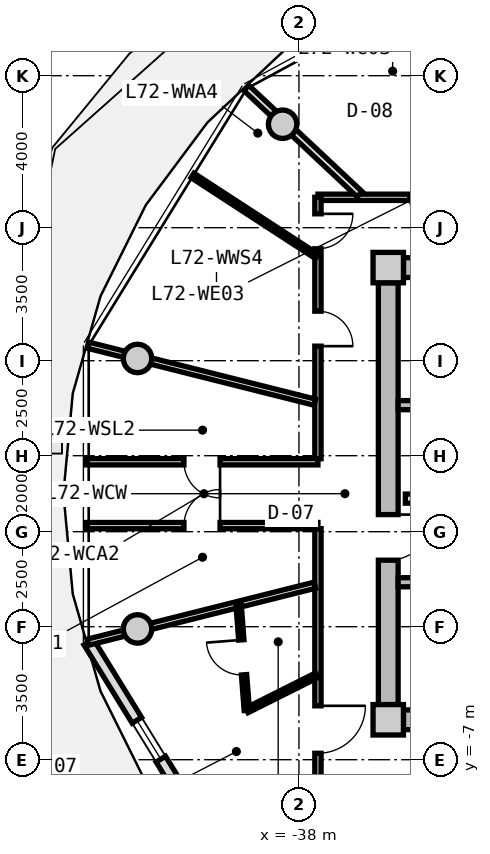
"""IFC4 building model, lengths in metres.
Left out: names, types, materials, properties, quantities, classifications, styles, units other than length and angle.
Written with IfcOpenShell. Run it as: python <this file> out.ifc"""

import sys

from ifc_helpers import new_model, si_unit, direction, frame, frame_2d, origin, origin_2d, place, context, subcontext, project, spatial, rectangle, circle, extrude, source, transform, mapped, element, fill, save


model = new_model("IFC4")
c1 = context("Model", 3, precision=1e-05, world=origin(), true_north=direction((0.0, 1.0)))
c2 = subcontext(c1, "Body", "Model", "MODEL_VIEW")
j1 = project(units=[si_unit("LENGTHUNIT", "METRE"), si_unit("PLANEANGLEUNIT", "RADIAN")], contexts=[c1])
p1 = place(None, origin())
s1 = spatial("IfcSite", under=j1, at=p1, CompositionType="ELEMENT")
p2 = place(p1, origin())
s2 = spatial("IfcBuilding", under=s1, at=p2, CompositionType="ELEMENT")
p3 = place(p2, frame((0.0, 0.0, 232.2)))
s3 = spatial("IfcBuildingStorey", under=s2, at=p3, CompositionType="ELEMENT", Elevation=232.2)
m1 = source(origin(), c2, "Body", "SweptSolid", [
    extrude(rectangle(XDim=0.8, YDim=0.8, at=origin_2d()), origin(), (0.0, 0.0, 1.0), 3.05),
])
for number, where, z_axis, x_axis in (
    (1, (-35.65, -5.95, 0.0), (0.0, 0.0, 1.0), (1.0, 0.0, 0.0)),
    (2, (-35.65, 5.95, 0.0), (0.0, 0.0, 1.0), (1.0, 0.0, 0.0)),
):
    element("IfcColumn", number, at=place(p3, frame(where, z_axis=z_axis, x_axis=x_axis)), inside=s3, PredefinedType="COLUMN", context=c2, shape_type="MappedRepresentation", body=[
        mapped(m1, transform((0.0, 0.0, 0.0), x_axis=(1.0, 0.0, 0.0), y_axis=(0.0, 1.0, 0.0), z_axis=(0.0, 0.0, 1.0), scale=1.0)),
    ])
m2 = source(origin(), c2, "Body", "SweptSolid", [
    extrude(rectangle(XDim=14.5, YDim=0.52, at=frame_2d((7.25, 0.0))), origin(), (0.0, 0.0, 1.0), 2.81),
])
for number, where, z_axis, x_axis in (
    (3, (-35.25, 5.95, 0.0), (0.0, 0.0, 1.0), (1.0, 0.0, 0.0)),
    (4, (-20.75, -5.95, 0.0), (0.0, 0.0, 1.0), (-1.0, 0.0, 0.0)),
):
    element("IfcWall", number, at=place(p3, frame(where, z_axis=z_axis, x_axis=x_axis)), inside=s3, PredefinedType="SHEAR", context=c2, shape_type="MappedRepresentation", body=[
        mapped(m2, transform((0.0, 0.0, 0.0), x_axis=(1.0, 0.0, 0.0), y_axis=(0.0, 1.0, 0.0), z_axis=(0.0, 0.0, 1.0), scale=1.0)),
    ])
m3 = source(origin(), c2, "Body", "SweptSolid", [
    extrude(rectangle(XDim=11.1, YDim=0.52, at=frame_2d((5.55, 0.0))), origin(), (0.0, 0.0, 1.0), 2.81),
])
p4 = place(p3, frame((-35.65, -5.55, 0.0), z_axis=(0.0, 0.0, 1.0), x_axis=(0.0, 1.0, 0.0)))
e5 = element("IfcWall", 5, at=p4, inside=s3, PredefinedType="SHEAR", context=c2, shape_type="MappedRepresentation", body=[
    mapped(m3, transform((0.0, 0.0, 0.0), x_axis=(1.0, 0.0, 0.0), y_axis=(0.0, 1.0, 0.0), z_axis=(0.0, 0.0, 1.0), scale=1.0)),
])
p5 = place(p4, frame((3.8, 0.0, 0.0)))
e6 = element("IfcOpeningElement", 6, at=p5, cuts=e5, PredefinedType="OPENING", context=c2, shape_type="SweptSolid", body=[
    extrude(rectangle(XDim=1.2, YDim=2.15, at=frame_2d((0.6, 1.075))), frame((0.0, 0.27, 0.0), z_axis=(0.0, -1.0, 0.0), x_axis=(1.0, 0.0, 0.0)), (0.0, 0.0, 1.0), 0.54),
])
m4 = source(origin(), c2, "Body", "SweptSolid", [
    extrude(circle(Radius=0.375, at=origin_2d()), origin(), (0.0, 0.0, 1.0), 3.05),
])
for number, where, z_axis, x_axis in (
    (7, (-38.43, 9.723, 0.0), (0.0, 0.0, 1.0), (1.0, 0.0, 0.0)),
    (8, (-42.247, 3.559, 0.0), (0.0, 0.0, 1.0), (1.0, 0.0, 0.0)),
    (9, (-42.247, -3.559, 0.0), (0.0, 0.0, 1.0), (1.0, 0.0, 0.0)),
):
    element("IfcColumn", number, at=place(p3, frame(where, z_axis=z_axis, x_axis=x_axis)), inside=s3, PredefinedType="COLUMN", context=c2, shape_type="MappedRepresentation", body=[
        mapped(m4, transform((0.0, 0.0, 0.0), x_axis=(1.0, 0.0, 0.0), y_axis=(0.0, 1.0, 0.0), z_axis=(0.0, 0.0, 1.0), scale=1.0)),
    ])
m5 = source(origin(), c2, "Body", "SweptSolid", [
    extrude(rectangle(XDim=7.938, YDim=0.29, at=frame_2d((3.969, 0.0))), origin(), (0.0, 0.0, 1.0), 2.81),
])
p6 = place(p3, frame((-39.37, -10.663, 0.0), z_axis=(0.0, 0.0, 1.0), x_axis=(-0.524244987663, 0.851567491694, 0.0)))
e10 = element("IfcWall", 10, at=p6, inside=s3, PredefinedType="SOLIDWALL", context=c2, shape_type="MappedRepresentation", body=[
    mapped(m5, transform((0.0, 0.0, 0.0), x_axis=(1.0, 0.0, 0.0), y_axis=(0.0, 1.0, 0.0), z_axis=(0.0, 0.0, 1.0), scale=1.0)),
])
p7 = place(p6, frame((0.9, 0.0, 0.0)))
e11 = element("IfcOpeningElement", 11, at=p7, cuts=e10, PredefinedType="OPENING", context=c2, shape_type="SweptSolid", body=[
    extrude(rectangle(XDim=1.15, YDim=2.25, at=frame_2d((0.575, 1.125))), frame((0.0, 0.155, 0.0), z_axis=(0.0, -1.0, 0.0), x_axis=(1.0, 0.0, 0.0)), (0.0, 0.0, 1.0), 0.31),
])
p8 = place(p6, frame((4.319, 0.0, 0.85)))
e12 = element("IfcOpeningElement", 12, at=p8, cuts=e10, PredefinedType="OPENING", context=c2, shape_type="SweptSolid", body=[
    extrude(rectangle(XDim=1.2, YDim=1.5, at=frame_2d((0.6, 0.75))), frame((0.0, 0.155, 0.0), z_axis=(0.0, -1.0, 0.0), x_axis=(1.0, 0.0, 0.0)), (0.0, 0.0, 1.0), 0.31),
])
m6 = source(origin(), c2, "Body", "SweptSolid", [
    extrude(rectangle(XDim=7.93, YDim=0.24, at=frame_2d((3.965, 0.0))), origin(), (0.0, 0.0, 1.0), 2.81),
])
p9 = place(p3, frame((-35.39, 2.33, 0.0), z_axis=(0.0, 0.0, 1.0), x_axis=(1.0, 0.0, 0.0)))
e13 = element("IfcWall", 13, at=p9, inside=s3, PredefinedType="PARTITIONING", context=c2, shape_type="MappedRepresentation", body=[
    mapped(m6, transform((0.0, 0.0, 0.0), x_axis=(1.0, 0.0, 0.0), y_axis=(0.0, 1.0, 0.0), z_axis=(0.0, 0.0, 1.0), scale=1.0)),
])
p10 = place(p3, frame((-35.39, -2.33, 0.0), z_axis=(0.0, 0.0, 1.0), x_axis=(1.0, 0.0, 0.0)))
e14 = element("IfcWall", 14, at=p10, inside=s3, PredefinedType="PARTITIONING", context=c2, shape_type="MappedRepresentation", body=[
    mapped(m6, transform((0.0, 0.0, 0.0), x_axis=(1.0, 0.0, 0.0), y_axis=(0.0, 1.0, 0.0), z_axis=(0.0, 0.0, 1.0), scale=1.0)),
])
p11 = place(p10, frame((1.05, 0.0, 0.0)))
e15 = element("IfcOpeningElement", 15, at=p11, cuts=e14, PredefinedType="OPENING", context=c2, shape_type="SweptSolid", body=[
    extrude(rectangle(XDim=1.1, YDim=2.15, at=frame_2d((0.55, 1.075))), frame((0.0, 0.13, 0.0), z_axis=(0.0, -1.0, 0.0), x_axis=(1.0, 0.0, 0.0)), (0.0, 0.0, 1.0), 0.26),
])
m7 = source(origin(), c2, "Body", "SweptSolid", [
    extrude(rectangle(XDim=7.62, YDim=0.24, at=frame_2d((3.81, 0.0))), origin(), (0.0, 0.0, 1.0), 2.795),
])
p12 = place(p3, frame((-35.2, -0.13, 0.0), z_axis=(0.0, 0.0, 1.0), x_axis=(1.0, 0.0, 0.0)))
e16 = element("IfcWall", 16, at=p12, inside=s3, PredefinedType="PARTITIONING", context=c2, shape_type="MappedRepresentation", body=[
    mapped(m7, transform((0.0, 0.0, 0.0), x_axis=(1.0, 0.0, 0.0), y_axis=(0.0, 1.0, 0.0), z_axis=(0.0, 0.0, 1.0), scale=1.0)),
])
p13 = place(p12, frame((6.22, 0.0, 0.0)))
e17 = element("IfcOpeningElement", 17, at=p13, cuts=e16, PredefinedType="OPENING", context=c2, shape_type="SweptSolid", body=[
    extrude(rectangle(XDim=1.0, YDim=2.1, at=frame_2d((0.5, 1.05))), frame((0.0, 0.13, 0.0), z_axis=(0.0, -1.0, 0.0), x_axis=(1.0, 0.0, 0.0)), (0.0, 0.0, 1.0), 0.26),
])
p14 = place(p12, frame((2.4, 0.0, 0.0)))
e18 = element("IfcOpeningElement", 18, at=p14, cuts=e16, PredefinedType="OPENING", context=c2, shape_type="SweptSolid", body=[
    extrude(rectangle(XDim=1.0, YDim=2.1, at=frame_2d((0.5, 1.05))), frame((0.0, 0.13, 0.0), z_axis=(0.0, -1.0, 0.0), x_axis=(1.0, 0.0, 0.0)), (0.0, 0.0, 1.0), 0.26),
])
m8 = source(origin(), c2, "Body", "SweptSolid", [
    extrude(rectangle(XDim=8.58, YDim=0.165, at=frame_2d((4.29, 0.0))), origin(), (0.0, 0.0, 1.0), 2.795),
])
p15 = place(p3, frame((-37.5, 7.8, 0.0), z_axis=(0.0, 0.0, 1.0), x_axis=(1.0, 0.0, 0.0)))
e19 = element("IfcWall", 19, at=p15, inside=s3, PredefinedType="PARTITIONING", context=c2, shape_type="MappedRepresentation", body=[
    mapped(m8, transform((0.0, 0.0, 0.0), x_axis=(1.0, 0.0, 0.0), y_axis=(0.0, 1.0, 0.0), z_axis=(0.0, 0.0, 1.0), scale=1.0)),
])
p16 = place(p15, frame((2.415, 0.0, 0.0)))
e20 = element("IfcOpeningElement", 20, at=p16, cuts=e19, PredefinedType="OPENING", context=c2, shape_type="SweptSolid", body=[
    extrude(rectangle(XDim=1.25, YDim=2.2, at=frame_2d((0.625, 1.1))), frame((0.0, 0.093, 0.0), z_axis=(0.0, -1.0, 0.0), x_axis=(1.0, 0.0, 0.0)), (0.0, 0.0, 1.0), 0.185),
])
m9 = source(origin(), c2, "Body", "SweptSolid", [
    extrude(rectangle(XDim=6.88, YDim=0.165, at=frame_2d((3.44, 0.0))), origin(), (0.0, 0.0, 1.0), 2.795),
])
p17 = place(p3, frame((-37.5, -7.8, 0.0), z_axis=(0.0, 0.0, 1.0), x_axis=(0.0, 1.0, 0.0)))
e21 = element("IfcWall", 21, at=p17, inside=s3, PredefinedType="PARTITIONING", context=c2, shape_type="MappedRepresentation", body=[
    mapped(m9, transform((0.0, 0.0, 0.0), x_axis=(1.0, 0.0, 0.0), y_axis=(0.0, 1.0, 0.0), z_axis=(0.0, 0.0, 1.0), scale=1.0)),
])
p18 = place(p17, frame((0.968, 0.0, 0.0)))
e22 = element("IfcOpeningElement", 22, at=p18, cuts=e21, PredefinedType="OPENING", context=c2, shape_type="SweptSolid", body=[
    extrude(rectangle(XDim=1.25, YDim=2.2, at=frame_2d((0.625, 1.1))), frame((0.0, 0.093, 0.0), z_axis=(0.0, -1.0, 0.0), x_axis=(1.0, 0.0, 0.0)), (0.0, 0.0, 1.0), 0.185),
])
p19 = place(p3, frame((-37.5, 0.92, 0.0), z_axis=(0.0, 0.0, 1.0), x_axis=(0.0, 1.0, 0.0)))
e23 = element("IfcWall", 23, at=p19, inside=s3, PredefinedType="PARTITIONING", context=c2, shape_type="MappedRepresentation", body=[
    mapped(m9, transform((0.0, 0.0, 0.0), x_axis=(1.0, 0.0, 0.0), y_axis=(0.0, 1.0, 0.0), z_axis=(0.0, 0.0, 1.0), scale=1.0)),
])
p20 = place(p19, frame((5.525, 0.0, 0.0)))
e24 = element("IfcOpeningElement", 24, at=p20, cuts=e23, PredefinedType="OPENING", context=c2, shape_type="SweptSolid", body=[
    extrude(rectangle(XDim=0.92, YDim=2.1, at=frame_2d((0.46, 1.05))), frame((0.0, 0.093, 0.0), z_axis=(0.0, -1.0, 0.0), x_axis=(1.0, 0.0, 0.0)), (0.0, 0.0, 1.0), 0.185),
])
p21 = place(p19, frame((2.962, 0.0, 0.0)))
e25 = element("IfcOpeningElement", 25, at=p21, cuts=e23, PredefinedType="OPENING", context=c2, shape_type="SweptSolid", body=[
    extrude(rectangle(XDim=0.92, YDim=2.1, at=frame_2d((0.46, 1.05))), frame((0.0, 0.093, 0.0), z_axis=(0.0, -1.0, 0.0), x_axis=(1.0, 0.0, 0.0)), (0.0, 0.0, 1.0), 0.185),
])
m10 = source(origin(), c2, "Body", "SweptSolid", [
    extrude(rectangle(XDim=6.157, YDim=0.165, at=frame_2d((3.079, 0.0))), origin(), (0.0, 0.0, 1.0), 2.435),
])
p22 = place(p3, frame((-37.58, 2.407, 0.0), z_axis=(0.0, 0.0, 1.0), x_axis=(-0.969840867184, 0.243738984038, 0.0)))
e26 = element("IfcWall", 26, at=p22, inside=s3, PredefinedType="PARTITIONING", context=c2, shape_type="MappedRepresentation", body=[
    mapped(m10, transform((0.0, 0.0, 0.0), x_axis=(1.0, 0.0, 0.0), y_axis=(0.0, 1.0, 0.0), z_axis=(0.0, 0.0, 1.0), scale=1.0)),
])
m11 = source(origin(), c2, "Body", "SweptSolid", [
    extrude(rectangle(XDim=6.157, YDim=0.165, at=frame_2d((3.079, 0.0))), origin(), (0.0, 0.0, 1.0), 2.395),
])
p23 = place(p3, frame((-37.58, -2.407, 0.0), z_axis=(0.0, 0.0, 1.0), x_axis=(-0.969840867184, -0.243738984038, 0.0)))
e27 = element("IfcWall", 27, at=p23, inside=s3, PredefinedType="PARTITIONING", context=c2, shape_type="MappedRepresentation", body=[
    mapped(m11, transform((0.0, 0.0, 0.0), x_axis=(1.0, 0.0, 0.0), y_axis=(0.0, 1.0, 0.0), z_axis=(0.0, 0.0, 1.0), scale=1.0)),
])
m12 = source(origin(), c2, "Body", "SweptSolid", [
    extrude(rectangle(XDim=6.101, YDim=0.165, at=frame_2d((3.051, 0.0))), origin(), (0.0, 0.0, 1.0), 2.795),
])
p24 = place(p3, frame((-43.601, 0.84, 0.0), z_axis=(0.0, 0.0, 1.0), x_axis=(1.0, 0.0, 0.0)))
e28 = element("IfcWall", 28, at=p24, inside=s3, PredefinedType="PARTITIONING", context=c2, shape_type="MappedRepresentation", body=[
    mapped(m12, transform((0.0, 0.0, 0.0), x_axis=(1.0, 0.0, 0.0), y_axis=(0.0, 1.0, 0.0), z_axis=(0.0, 0.0, 1.0), scale=1.0)),
])
p25 = place(p24, frame((2.576, 0.0, 0.0)))
e29 = element("IfcOpeningElement", 29, at=p25, cuts=e28, PredefinedType="OPENING", context=c2, shape_type="SweptSolid", body=[
    extrude(rectangle(XDim=0.95, YDim=2.1, at=frame_2d((0.475, 1.05))), frame((0.0, 0.093, 0.0), z_axis=(0.0, -1.0, 0.0), x_axis=(1.0, 0.0, 0.0)), (0.0, 0.0, 1.0), 0.185),
])
p26 = place(p3, frame((-37.5, -0.84, 0.0), z_axis=(0.0, 0.0, 1.0), x_axis=(-1.0, 0.0, 0.0)))
e30 = element("IfcWall", 30, at=p26, inside=s3, PredefinedType="PARTITIONING", context=c2, shape_type="MappedRepresentation", body=[
    mapped(m12, transform((0.0, 0.0, 0.0), x_axis=(1.0, 0.0, 0.0), y_axis=(0.0, 1.0, 0.0), z_axis=(0.0, 0.0, 1.0), scale=1.0)),
])
p27 = place(p26, frame((2.576, 0.0, 0.0)))
e31 = element("IfcOpeningElement", 31, at=p27, cuts=e30, PredefinedType="OPENING", context=c2, shape_type="SweptSolid", body=[
    extrude(rectangle(XDim=0.95, YDim=2.1, at=frame_2d((0.475, 1.05))), frame((0.0, 0.093, 0.0), z_axis=(0.0, -1.0, 0.0), x_axis=(1.0, 0.0, 0.0)), (0.0, 0.0, 1.0), 0.185),
])
m13 = source(origin(), c2, "Body", "SweptSolid", [
    extrude(rectangle(XDim=4.089, YDim=0.19, at=frame_2d((2.044, 0.0))), origin(), (0.0, 0.0, 1.0), 2.395),
])
p28 = place(p3, frame((-36.402, 7.88, 0.0), z_axis=(0.0, 0.0, 1.0), x_axis=(-0.729401273609, 0.684086092577, 0.0)))
e32 = element("IfcWall", 32, at=p28, inside=s3, PredefinedType="PARTITIONING", context=c2, shape_type="MappedRepresentation", body=[
    mapped(m13, transform((0.0, 0.0, 0.0), x_axis=(1.0, 0.0, 0.0), y_axis=(0.0, 1.0, 0.0), z_axis=(0.0, 0.0, 1.0), scale=1.0)),
])
m14 = source(origin(), c2, "Body", "SweptSolid", [
    extrude(rectangle(XDim=3.904, YDim=0.14, at=frame_2d((1.952, 0.0))), origin(), (0.0, 0.0, 1.0), 2.795),
])
p29 = place(p3, frame((-37.53, 6.246, 0.0), z_axis=(0.0, 0.0, 1.0), x_axis=(-0.838024687996, 0.545632314209, 0.0)))
e33 = element("IfcWall", 33, at=p29, inside=s3, PredefinedType="PARTITIONING", context=c2, shape_type="MappedRepresentation", body=[
    mapped(m14, transform((0.0, 0.0, 0.0), x_axis=(1.0, 0.0, 0.0), y_axis=(0.0, 1.0, 0.0), z_axis=(0.0, 0.0, 1.0), scale=1.0)),
])
m15 = source(origin(), c2, "Body", "SweptSolid", [
    extrude(rectangle(XDim=2.06, YDim=0.14, at=frame_2d((1.03, 0.0))), origin(), (0.0, 0.0, 1.0), 2.795),
])
p30 = place(p3, frame((-37.53, -4.778, 0.0), z_axis=(0.0, 0.0, 1.0), x_axis=(-0.893952568722, -0.448161583444, 0.0)))
e34 = element("IfcWall", 34, at=p30, inside=s3, PredefinedType="PARTITIONING", context=c2, shape_type="MappedRepresentation", body=[
    mapped(m15, transform((0.0, 0.0, 0.0), x_axis=(1.0, 0.0, 0.0), y_axis=(0.0, 1.0, 0.0), z_axis=(0.0, 0.0, 1.0), scale=1.0)),
])
m16 = source(origin(), c2, "Body", "SweptSolid", [
    extrude(rectangle(XDim=2.798, YDim=0.14, at=frame_2d((1.399, 0.0))), origin(), (0.0, 0.0, 1.0), 2.795),
])
p31 = place(p3, frame((-39.371, -5.701, 0.0), z_axis=(0.0, 0.0, 1.0), x_axis=(-0.077823984089, 0.996967114553, 0.0)))
e35 = element("IfcWall", 35, at=p31, inside=s3, PredefinedType="PARTITIONING", context=c2, shape_type="MappedRepresentation", body=[
    mapped(m16, transform((0.0, 0.0, 0.0), x_axis=(1.0, 0.0, 0.0), y_axis=(0.0, 1.0, 0.0), z_axis=(0.0, 0.0, 1.0), scale=1.0)),
])
p32 = place(p31, frame((0.939, 0.0, 0.0)))
e36 = element("IfcOpeningElement", 36, at=p32, cuts=e35, PredefinedType="OPENING", context=c2, shape_type="SweptSolid", body=[
    extrude(rectangle(XDim=0.92, YDim=2.1, at=frame_2d((0.46, 1.05))), frame((0.0, 0.08, 0.0), z_axis=(0.0, -1.0, 0.0), x_axis=(1.0, 0.0, 0.0)), (0.0, 0.0, 1.0), 0.16),
])
m17 = source(origin(), c2, "Body", "SweptSolid", [
    extrude(rectangle(XDim=1.2, YDim=1.5, at=frame_2d((0.6, 0.75))), frame((0.0, 0.03, 0.0), z_axis=(0.0, -1.0, 0.0), x_axis=(1.0, 0.0, 0.0)), (0.0, 0.0, 1.0), 0.06),
])
p33 = place(p8, origin())
e37 = element("IfcWindow", 37, at=p33, inside=s3, PartitioningType="SINGLE_PANEL", PredefinedType="WINDOW", context=c2, shape_type="MappedRepresentation", body=[
    mapped(m17, transform((0.0, 0.0, 0.0), x_axis=(1.0, 0.0, 0.0), y_axis=(0.0, 1.0, 0.0), z_axis=(0.0, 0.0, 1.0), scale=1.0)),
])
fill(e12, e37)
m18 = source(origin(), c2, "Body", "SweptSolid", [
    extrude(rectangle(XDim=1.2, YDim=2.15, at=frame_2d((0.6, 1.075))), frame((0.0, 0.025, 0.0), z_axis=(0.0, -1.0, 0.0), x_axis=(1.0, 0.0, 0.0)), (0.0, 0.0, 1.0), 0.05),
])
p34 = place(p5, frame((1.2, 0.0, 0.0), z_axis=(0.0, 0.0, 1.0), x_axis=(-1.0, 0.0, 0.0)))
e38 = element("IfcDoor", 38, at=p34, inside=s3, OperationType="SINGLE_SWING_LEFT", PredefinedType="DOOR", context=c2, shape_type="MappedRepresentation", body=[
    mapped(m18, transform((0.0, 0.0, 0.0), x_axis=(1.0, 0.0, 0.0), y_axis=(0.0, 1.0, 0.0), z_axis=(0.0, 0.0, 1.0), scale=1.0)),
])
fill(e6, e38)
m19 = source(origin(), c2, "Body", "SweptSolid", [
    extrude(rectangle(XDim=0.95, YDim=2.1, at=frame_2d((0.475, 1.05))), frame((0.0, 0.025, 0.0), z_axis=(0.0, -1.0, 0.0), x_axis=(1.0, 0.0, 0.0)), (0.0, 0.0, 1.0), 0.05),
])
p35 = place(p27, frame((0.95, 0.0, 0.0), z_axis=(0.0, 0.0, 1.0), x_axis=(-1.0, 0.0, 0.0)))
e39 = element("IfcDoor", 39, at=p35, inside=s3, OperationType="SINGLE_SWING_RIGHT", PredefinedType="DOOR", context=c2, shape_type="MappedRepresentation", body=[
    mapped(m19, transform((0.0, 0.0, 0.0), x_axis=(1.0, 0.0, 0.0), y_axis=(0.0, 1.0, 0.0), z_axis=(0.0, 0.0, 1.0), scale=1.0)),
])
fill(e31, e39)
p36 = place(p25, frame((0.95, 0.0, 0.0), z_axis=(0.0, 0.0, 1.0), x_axis=(-1.0, 0.0, 0.0)))
e40 = element("IfcDoor", 40, at=p36, inside=s3, OperationType="SINGLE_SWING_LEFT", PredefinedType="DOOR", context=c2, shape_type="MappedRepresentation", body=[
    mapped(m19, transform((0.0, 0.0, 0.0), x_axis=(1.0, 0.0, 0.0), y_axis=(0.0, 1.0, 0.0), z_axis=(0.0, 0.0, 1.0), scale=1.0)),
])
fill(e29, e40)
m20 = source(origin(), c2, "Body", "SweptSolid", [
    extrude(rectangle(XDim=1.25, YDim=2.2, at=frame_2d((0.625, 1.1))), frame((0.0, 0.025, 0.0), z_axis=(0.0, -1.0, 0.0), x_axis=(1.0, 0.0, 0.0)), (0.0, 0.0, 1.0), 0.05),
])
p37 = place(p16, frame((1.25, 0.0, 0.0), z_axis=(0.0, 0.0, 1.0), x_axis=(-1.0, 0.0, 0.0)))
e41 = element("IfcDoor", 41, at=p37, inside=s3, OperationType="SINGLE_SWING_LEFT", PredefinedType="DOOR", context=c2, shape_type="MappedRepresentation", body=[
    mapped(m20, transform((0.0, 0.0, 0.0), x_axis=(1.0, 0.0, 0.0), y_axis=(0.0, 1.0, 0.0), z_axis=(0.0, 0.0, 1.0), scale=1.0)),
])
fill(e20, e41)
m21 = source(origin(), c2, "Body", "SweptSolid", [
    extrude(rectangle(XDim=0.92, YDim=2.1, at=frame_2d((0.46, 1.05))), frame((0.0, 0.025, 0.0), z_axis=(0.0, -1.0, 0.0), x_axis=(1.0, 0.0, 0.0)), (0.0, 0.0, 1.0), 0.05),
])
p38 = place(p20, frame((0.92, 0.0, 0.0), z_axis=(0.0, 0.0, 1.0), x_axis=(-1.0, 0.0, 0.0)))
e42 = element("IfcDoor", 42, at=p38, inside=s3, OperationType="SINGLE_SWING_LEFT", PredefinedType="DOOR", context=c2, shape_type="MappedRepresentation", body=[
    mapped(m21, transform((0.0, 0.0, 0.0), x_axis=(1.0, 0.0, 0.0), y_axis=(0.0, 1.0, 0.0), z_axis=(0.0, 0.0, 1.0), scale=1.0)),
])
fill(e24, e42)
p39 = place(p21, frame((0.92, 0.0, 0.0), z_axis=(0.0, 0.0, 1.0), x_axis=(-1.0, 0.0, 0.0)))
e43 = element("IfcDoor", 43, at=p39, inside=s3, OperationType="SINGLE_SWING_RIGHT", PredefinedType="DOOR", context=c2, shape_type="MappedRepresentation", body=[
    mapped(m21, transform((0.0, 0.0, 0.0), x_axis=(1.0, 0.0, 0.0), y_axis=(0.0, 1.0, 0.0), z_axis=(0.0, 0.0, 1.0), scale=1.0)),
])
fill(e25, e43)
p40 = place(p18, frame((1.25, 0.0, 0.0), z_axis=(0.0, 0.0, 1.0), x_axis=(-1.0, 0.0, 0.0)))
e44 = element("IfcDoor", 44, at=p40, inside=s3, OperationType="SINGLE_SWING_LEFT", PredefinedType="DOOR", context=c2, shape_type="MappedRepresentation", body=[
    mapped(m20, transform((0.0, 0.0, 0.0), x_axis=(1.0, 0.0, 0.0), y_axis=(0.0, 1.0, 0.0), z_axis=(0.0, 0.0, 1.0), scale=1.0)),
])
fill(e22, e44)
p41 = place(p32, origin())
e45 = element("IfcDoor", 45, at=p41, inside=s3, OperationType="SINGLE_SWING_RIGHT", PredefinedType="DOOR", context=c2, shape_type="MappedRepresentation", body=[
    mapped(m21, transform((0.0, 0.0, 0.0), x_axis=(1.0, 0.0, 0.0), y_axis=(0.0, 1.0, 0.0), z_axis=(0.0, 0.0, 1.0), scale=1.0)),
])
fill(e36, e45)
save(model, sys.argv[1])
